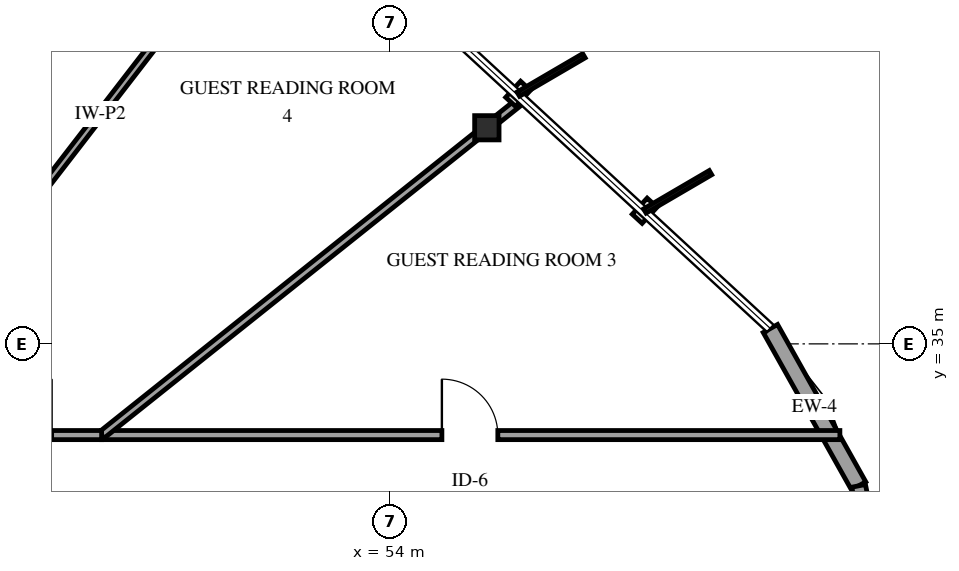
"""IFC4 building model, lengths in metres.
Left out: names, types, materials, properties, quantities, classifications, styles, units other than length and angle.
Written with IfcOpenShell. Run it as: python <this file> out.ifc"""

import sys

from ifc_helpers import new_model, si_unit, direction, frame, frame_2d, origin, origin_2d, place, context, subcontext, project, spatial, rectangle, i_section, extrude, element, fill, save


model = new_model("IFC4")
c1 = context("Model", 3, precision=1e-05, world=origin(), true_north=direction((0.0, 1.0)))
c2 = subcontext(c1, "Body", "Model", "MODEL_VIEW")
j1 = project(units=[si_unit("LENGTHUNIT", "METRE"), si_unit("PLANEANGLEUNIT", "RADIAN")], contexts=[c1])
p1 = place(None, origin())
s1 = spatial("IfcSite", under=j1, at=p1, CompositionType="ELEMENT")
p2 = place(p1, origin())
s2 = spatial("IfcBuilding", under=s1, at=p2, CompositionType="ELEMENT")
p3 = place(p2, frame((0.0, 0.0, 272.5)))
s3 = spatial("IfcBuildingStorey", under=s2, at=p3, CompositionType="ELEMENT", Elevation=272.5)
p4 = place(p3, frame((55.589, 38.554, 0.0), z_axis=(0.0, 0.0, 1.0), x_axis=(1.0, 0.0, 0.0)))
e1 = element("IfcColumn", 1, at=p4, inside=s3, PredefinedType="COLUMN", context=c2, shape_type="SweptSolid", body=[
    extrude(i_section(OverallWidth=0.401, OverallDepth=0.399, WebThickness=0.025, FlangeThickness=0.04, FilletRadius=0.038, at=origin_2d()), origin(), (0.0, 0.0, 1.0), 3.75),
])
p5 = place(p3, frame((61.703, 32.665, 0.0), z_axis=(0.0, 0.0, 1.0), x_axis=(-0.489112025422, 0.872220973485, 0.0)))
e2 = element("IfcWall", 2, at=p5, inside=s3, PredefinedType="SOLIDWALL", context=c2, shape_type="SweptSolid", body=[
    extrude(rectangle(XDim=2.967, YDim=0.27, at=frame_2d((1.483, 0.0))), origin(), (0.0, 0.0, 1.0), 2.829),
])
p6 = place(p3, frame((63.366, 24.33, 0.0), z_axis=(0.0, 0.0, 1.0), x_axis=(-0.195602411619, 0.980683280457, 0.0)))
e3 = element("IfcWall", 3, at=p6, inside=s3, PredefinedType="SOLIDWALL", context=c2, shape_type="SweptSolid", body=[
    extrude(rectangle(XDim=8.5, YDim=0.23, at=frame_2d((4.25, 0.0))), origin(), (0.0, 0.0, 1.0), 2.829),
])
p7 = place(p6, frame((3.75, 0.0, 0.0)))
e4 = element("IfcOpeningElement", 4, at=p7, cuts=e3, PredefinedType="OPENING", context=c2, shape_type="SweptSolid", body=[
    extrude(rectangle(XDim=1.0, YDim=2.15, at=frame_2d((0.5, 1.075))), frame((0.0, 0.125, 0.0), z_axis=(0.0, -1.0, 0.0), x_axis=(1.0, 0.0, 0.0)), (0.0, 0.0, 1.0), 0.25),
])
p8 = place(p6, frame((0.44, 0.0, 0.72)))
e5 = element("IfcOpeningElement", 5, at=p8, cuts=e3, PredefinedType="OPENING", context=c2, shape_type="SweptSolid", body=[
    extrude(rectangle(XDim=1.05, YDim=1.55, at=frame_2d((0.525, 0.775))), frame((0.0, 0.125, 0.0), z_axis=(0.0, -1.0, 0.0), x_axis=(1.0, 0.0, 0.0)), (0.0, 0.0, 1.0), 0.25),
])
p9 = place(p6, frame((5.93, 0.0, 0.72)))
e6 = element("IfcOpeningElement", 6, at=p9, cuts=e3, PredefinedType="OPENING", context=c2, shape_type="SweptSolid", body=[
    extrude(rectangle(XDim=1.05, YDim=1.55, at=frame_2d((0.525, 0.775))), frame((0.0, 0.125, 0.0), z_axis=(0.0, -1.0, 0.0), x_axis=(1.0, 0.0, 0.0)), (0.0, 0.0, 1.0), 0.25),
])
p10 = place(p3, frame((49.254, 33.5, 0.0), z_axis=(0.0, 0.0, 1.0), x_axis=(1.0, 0.0, 0.0)))
e7 = element("IfcWall", 7, at=p10, inside=s3, PredefinedType="PARTITIONING", context=c2, shape_type="SweptSolid", body=[
    extrude(rectangle(XDim=12.141, YDim=0.15, at=frame_2d((6.071, 0.0))), origin(), (0.0, 0.0, 1.0), 3.45),
])
p11 = place(p10, frame((5.596, 0.0, 0.0)))
e8 = element("IfcOpeningElement", 8, at=p11, cuts=e7, PredefinedType="OPENING", context=c2, shape_type="SweptSolid", body=[
    extrude(rectangle(XDim=0.92, YDim=2.12, at=frame_2d((0.46, 1.06))), frame((0.0, 0.085, 0.0), z_axis=(0.0, -1.0, 0.0), x_axis=(1.0, 0.0, 0.0)), (0.0, 0.0, 1.0), 0.17),
])
p12 = place(p3, frame((49.254, 33.5, 0.0), z_axis=(0.0, 0.0, 1.0), x_axis=(0.78171305869, 0.623638271655, 0.0)))
e9 = element("IfcWall", 9, at=p12, inside=s3, PredefinedType="PARTITIONING", context=c2, shape_type="SweptSolid", body=[
    extrude(rectangle(XDim=8.851, YDim=0.13, at=frame_2d((4.426, 0.0))), origin(), (0.0, 0.0, 1.0), 3.45),
])
p13 = place(p3, frame((46.65, 35.429, 0.0), z_axis=(0.0, 0.0, 1.0), x_axis=(0.611044555743, 0.791596204448, 0.0)))
e10 = element("IfcWall", 10, at=p13, inside=s3, PredefinedType="PARTITIONING", context=c2, shape_type="SweptSolid", body=[
    extrude(rectangle(XDim=8.451, YDim=0.12, at=frame_2d((4.226, 0.0))), origin(), (0.0, 0.0, 1.0), 2.828),
])
p14 = place(p3, frame((46.72, 33.5, 0.0), z_axis=(0.0, 0.0, 1.0), x_axis=(1.0, 0.0, 0.0)))
e11 = element("IfcWall", 11, at=p14, inside=s3, PredefinedType="PARTITIONING", context=c2, shape_type="SweptSolid", body=[
    extrude(rectangle(XDim=2.534, YDim=0.15, at=frame_2d((1.267, 0.0))), origin(), (0.0, 0.0, 1.0), 2.828),
])
p15 = place(p14, frame((0.792, 0.0, 0.0)))
e12 = element("IfcOpeningElement", 12, at=p15, cuts=e11, PredefinedType="OPENING", context=c2, shape_type="SweptSolid", body=[
    extrude(rectangle(XDim=0.92, YDim=2.12, at=frame_2d((0.46, 1.06))), frame((0.0, 0.085, 0.0), z_axis=(0.0, -1.0, 0.0), x_axis=(1.0, 0.0, 0.0)), (0.0, 0.0, 1.0), 0.17),
])
p16 = place(p11, origin())
e13 = element("IfcDoor", 13, at=p16, inside=s3, OperationType="SINGLE_SWING_LEFT", PredefinedType="DOOR", context=c2, shape_type="SweptSolid", body=[
    extrude(rectangle(XDim=0.92, YDim=2.12, at=frame_2d((0.46, 1.06))), frame((0.0, 0.025, 0.0), z_axis=(0.0, -1.0, 0.0), x_axis=(1.0, 0.0, 0.0)), (0.0, 0.0, 1.0), 0.05),
])
fill(e8, e13)
save(model, sys.argv[1])
